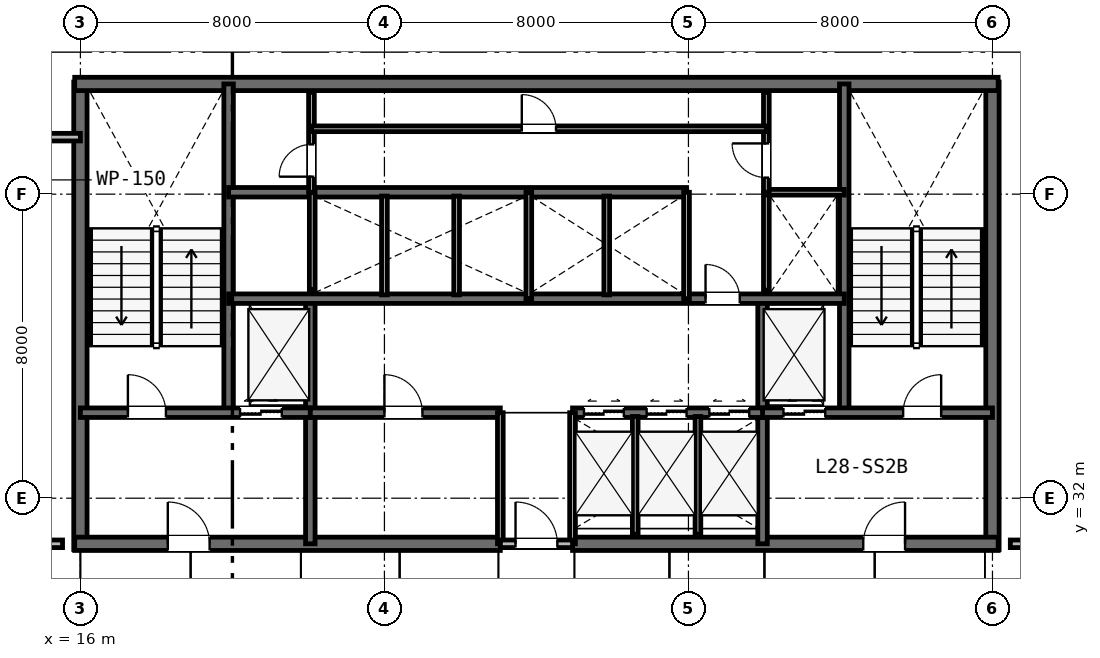
"""IFC4 building model, lengths in metres.
Left out: names, types, materials, properties, quantities, classifications, styles, units other than length and angle.
Written with IfcOpenShell. Run it as: python <this file> out.ifc"""

import sys

from ifc_helpers import new_model, si_unit, direction, frame, frame_2d, origin, place, context, subcontext, project, spatial, rectangle, extrude, element, fill, save


model = new_model("IFC4")
c1 = context("Model", 3, precision=1e-05, world=origin(), true_north=direction((0.0, 1.0)))
c2 = subcontext(c1, "Body", "Model", "MODEL_VIEW")
j1 = project(units=[si_unit("LENGTHUNIT", "METRE"), si_unit("PLANEANGLEUNIT", "RADIAN")], contexts=[c1])
p1 = place(None, origin())
s1 = spatial("IfcSite", under=j1, at=p1, CompositionType="ELEMENT")
p2 = place(p1, origin())
s2 = spatial("IfcBuilding", under=s1, at=p2, CompositionType="ELEMENT")
p3 = place(p2, frame((0.0, 0.0, 111.6)))
s3 = spatial("IfcBuildingStorey", under=s2, at=p3, CompositionType="ELEMENT", Elevation=111.6)
for number, where, z_axis, x_axis in (
    (1, (16.0, 30.65, 0.0), (0.0, 0.0, 1.0), (0.0, 1.0, 0.0)),
    (2, (40.0, 30.65, 0.0), (0.0, 0.0, 1.0), (0.0, 1.0, 0.0)),
):
    element("IfcWall", number, at=place(p3, frame(where, z_axis=z_axis, x_axis=x_axis)), inside=s3, PredefinedType="SHEAR", context=c2, shape_type="SweptSolid", body=[
        extrude(rectangle(XDim=12.3, YDim=0.35, at=frame_2d((6.15, 0.0))), origin(), (0.0, 0.0, 1.0), 3.6),
    ])
p4 = place(p3, frame((15.85, 42.9, 0.0), z_axis=(0.0, 0.0, 1.0), x_axis=(1.0, 0.0, 0.0)))
e3 = element("IfcWall", 3, at=p4, inside=s3, PredefinedType="SHEAR", context=c2, shape_type="SweptSolid", body=[
    extrude(rectangle(XDim=24.3, YDim=0.35, at=frame_2d((12.15, 0.0))), origin(), (0.0, 0.0, 1.0), 3.6),
])
p5 = place(p3, frame((15.85, 30.8, 0.0), z_axis=(0.0, 0.0, 1.0), x_axis=(1.0, 0.0, 0.0)))
e4 = element("IfcWall", 4, at=p5, inside=s3, PredefinedType="SHEAR", context=c2, shape_type="SweptSolid", body=[
    extrude(rectangle(XDim=11.2, YDim=0.35, at=frame_2d((5.6, 0.0))), origin(), (0.0, 0.0, 1.0), 3.6),
])
p6 = place(p5, frame((2.45, 0.0, 0.0)))
e5 = element("IfcOpeningElement", 5, at=p6, cuts=e4, PredefinedType="OPENING", context=c2, shape_type="SweptSolid", body=[
    extrude(rectangle(XDim=1.1, YDim=2.15, at=frame_2d((0.55, 1.075))), frame((0.0, 0.185, 0.0), z_axis=(0.0, -1.0, 0.0), x_axis=(1.0, 0.0, 0.0)), (0.0, 0.0, 1.0), 0.37),
])
p7 = place(p3, frame((28.95, 30.8, 0.0), z_axis=(0.0, 0.0, 1.0), x_axis=(1.0, 0.0, 0.0)))
e6 = element("IfcWall", 6, at=p7, inside=s3, PredefinedType="SHEAR", context=c2, shape_type="SweptSolid", body=[
    extrude(rectangle(XDim=11.2, YDim=0.35, at=frame_2d((5.6, 0.0))), origin(), (0.0, 0.0, 1.0), 3.6),
])
p8 = place(p7, frame((7.65, 0.0, 0.0)))
e7 = element("IfcOpeningElement", 7, at=p8, cuts=e6, PredefinedType="OPENING", context=c2, shape_type="SweptSolid", body=[
    extrude(rectangle(XDim=1.1, YDim=2.15, at=frame_2d((0.55, 1.075))), frame((0.0, 0.185, 0.0), z_axis=(0.0, -1.0, 0.0), x_axis=(1.0, 0.0, 0.0)), (0.0, 0.0, 1.0), 0.37),
])
for number, where, z_axis, x_axis in (
    (8, (19.9, 34.25, 0.0), (0.0, 0.0, 1.0), (0.0, 1.0, 0.0)),
    (9, (36.1, 34.25, 0.0), (0.0, 0.0, 1.0), (0.0, 1.0, 0.0)),
):
    element("IfcWall", number, at=place(p3, frame(where, z_axis=z_axis, x_axis=x_axis)), inside=s3, PredefinedType="SHEAR", context=c2, shape_type="SweptSolid", body=[
        extrude(rectangle(XDim=8.65, YDim=0.25, at=frame_2d((4.325, 0.0))), origin(), (0.0, 0.0, 1.0), 3.6),
    ])
for number, where, z_axis, x_axis in (
    (10, (22.05, 30.8, 0.0), (0.0, 0.0, 1.0), (0.0, 1.0, 0.0)),
    (11, (33.95, 30.8, 0.0), (0.0, 0.0, 1.0), (0.0, 1.0, 0.0)),
):
    element("IfcWall", number, at=place(p3, frame(where, z_axis=z_axis, x_axis=x_axis)), inside=s3, PredefinedType="SHEAR", context=c2, shape_type="SweptSolid", body=[
        extrude(rectangle(XDim=6.45, YDim=0.25, at=frame_2d((3.225, 0.0))), origin(), (0.0, 0.0, 1.0), 3.6),
    ])
p9 = place(p3, frame((16.0, 34.25, 0.0), z_axis=(0.0, 0.0, 1.0), x_axis=(1.0, 0.0, 0.0)))
e12 = element("IfcWall", 12, at=p9, inside=s3, PredefinedType="SHEAR", context=c2, shape_type="SweptSolid", body=[
    extrude(rectangle(XDim=6.05, YDim=0.25, at=frame_2d((3.025, 0.0))), origin(), (0.0, 0.0, 1.0), 3.6),
])
p10 = place(p9, frame((1.25, 0.0, 0.0)))
e13 = element("IfcOpeningElement", 13, at=p10, cuts=e12, PredefinedType="OPENING", context=c2, shape_type="SweptSolid", body=[
    extrude(rectangle(XDim=1.0, YDim=2.15, at=frame_2d((0.5, 1.075))), frame((0.0, 0.135, 0.0), z_axis=(0.0, -1.0, 0.0), x_axis=(1.0, 0.0, 0.0)), (0.0, 0.0, 1.0), 0.27),
])
p11 = place(p9, frame((4.2, 0.0, 0.0)))
e14 = element("IfcOpeningElement", 14, at=p11, cuts=e12, PredefinedType="OPENING", context=c2, shape_type="SweptSolid", body=[
    extrude(rectangle(XDim=1.1, YDim=2.15, at=frame_2d((0.55, 1.075))), frame((0.0, 0.135, 0.0), z_axis=(0.0, -1.0, 0.0), x_axis=(1.0, 0.0, 0.0)), (0.0, 0.0, 1.0), 0.27),
])
p12 = place(p3, frame((33.95, 34.25, 0.0), z_axis=(0.0, 0.0, 1.0), x_axis=(1.0, 0.0, 0.0)))
e15 = element("IfcWall", 15, at=p12, inside=s3, PredefinedType="SHEAR", context=c2, shape_type="SweptSolid", body=[
    extrude(rectangle(XDim=6.05, YDim=0.25, at=frame_2d((3.025, 0.0))), origin(), (0.0, 0.0, 1.0), 3.6),
])
p13 = place(p12, frame((3.7, 0.0, 0.0)))
e16 = element("IfcOpeningElement", 16, at=p13, cuts=e15, PredefinedType="OPENING", context=c2, shape_type="SweptSolid", body=[
    extrude(rectangle(XDim=1.0, YDim=2.15, at=frame_2d((0.5, 1.075))), frame((0.0, 0.135, 0.0), z_axis=(0.0, -1.0, 0.0), x_axis=(1.0, 0.0, 0.0)), (0.0, 0.0, 1.0), 0.27),
])
p14 = place(p12, frame((0.55, 0.0, 0.0)))
e17 = element("IfcOpeningElement", 17, at=p14, cuts=e15, PredefinedType="OPENING", context=c2, shape_type="SweptSolid", body=[
    extrude(rectangle(XDim=1.1, YDim=2.15, at=frame_2d((0.55, 1.075))), frame((0.0, 0.135, 0.0), z_axis=(0.0, -1.0, 0.0), x_axis=(1.0, 0.0, 0.0)), (0.0, 0.0, 1.0), 0.27),
])
p15 = place(p3, frame((22.05, 34.25, 0.0), z_axis=(0.0, 0.0, 1.0), x_axis=(1.0, 0.0, 0.0)))
e18 = element("IfcWall", 18, at=p15, inside=s3, PredefinedType="SHEAR", context=c2, shape_type="SweptSolid", body=[
    extrude(rectangle(XDim=5.0, YDim=0.25, at=frame_2d((2.5, 0.0))), origin(), (0.0, 0.0, 1.0), 3.6),
])
p16 = place(p15, frame((1.95, 0.0, 0.0)))
e19 = element("IfcOpeningElement", 19, at=p16, cuts=e18, PredefinedType="OPENING", context=c2, shape_type="SweptSolid", body=[
    extrude(rectangle(XDim=1.0, YDim=2.15, at=frame_2d((0.5, 1.075))), frame((0.0, 0.135, 0.0), z_axis=(0.0, -1.0, 0.0), x_axis=(1.0, 0.0, 0.0)), (0.0, 0.0, 1.0), 0.27),
])
p17 = place(p3, frame((28.95, 34.25, 0.0), z_axis=(0.0, 0.0, 1.0), x_axis=(1.0, 0.0, 0.0)))
e20 = element("IfcWall", 20, at=p17, inside=s3, PredefinedType="SHEAR", context=c2, shape_type="SweptSolid", body=[
    extrude(rectangle(XDim=5.0, YDim=0.25, at=frame_2d((2.5, 0.0))), origin(), (0.0, 0.0, 1.0), 3.6),
])
p18 = place(p17, frame((0.3, 0.0, 0.0)))
e21 = element("IfcOpeningElement", 21, at=p18, cuts=e20, PredefinedType="OPENING", context=c2, shape_type="SweptSolid", body=[
    extrude(rectangle(XDim=1.05, YDim=2.15, at=frame_2d((0.525, 1.075))), frame((0.0, 0.135, 0.0), z_axis=(0.0, -1.0, 0.0), x_axis=(1.0, 0.0, 0.0)), (0.0, 0.0, 1.0), 0.27),
])
p19 = place(p17, frame((1.95, 0.0, 0.0)))
e22 = element("IfcOpeningElement", 22, at=p19, cuts=e20, PredefinedType="OPENING", context=c2, shape_type="SweptSolid", body=[
    extrude(rectangle(XDim=1.05, YDim=2.15, at=frame_2d((0.525, 1.075))), frame((0.0, 0.135, 0.0), z_axis=(0.0, -1.0, 0.0), x_axis=(1.0, 0.0, 0.0)), (0.0, 0.0, 1.0), 0.27),
])
p20 = place(p17, frame((3.6, 0.0, 0.0)))
e23 = element("IfcOpeningElement", 23, at=p20, cuts=e20, PredefinedType="OPENING", context=c2, shape_type="SweptSolid", body=[
    extrude(rectangle(XDim=1.05, YDim=2.15, at=frame_2d((0.525, 1.075))), frame((0.0, 0.135, 0.0), z_axis=(0.0, -1.0, 0.0), x_axis=(1.0, 0.0, 0.0)), (0.0, 0.0, 1.0), 0.27),
])
p21 = place(p3, frame((19.9, 37.25, 0.0), z_axis=(0.0, 0.0, 1.0), x_axis=(1.0, 0.0, 0.0)))
e24 = element("IfcWall", 24, at=p21, inside=s3, PredefinedType="SHEAR", context=c2, shape_type="SweptSolid", body=[
    extrude(rectangle(XDim=16.2, YDim=0.25, at=frame_2d((8.1, 0.0))), origin(), (0.0, 0.0, 1.0), 3.6),
])
p22 = place(p21, frame((12.55, 0.0, 0.0)))
e25 = element("IfcOpeningElement", 25, at=p22, cuts=e24, PredefinedType="OPENING", context=c2, shape_type="SweptSolid", body=[
    extrude(rectangle(XDim=0.9, YDim=2.15, at=frame_2d((0.45, 1.075))), frame((0.0, 0.135, 0.0), z_axis=(0.0, -1.0, 0.0), x_axis=(1.0, 0.0, 0.0)), (0.0, 0.0, 1.0), 0.27),
])
p23 = place(p3, frame((19.9, 40.05, 0.0), z_axis=(0.0, 0.0, 1.0), x_axis=(1.0, 0.0, 0.0)))
e26 = element("IfcWall", 26, at=p23, inside=s3, PredefinedType="SHEAR", context=c2, shape_type="SweptSolid", body=[
    extrude(rectangle(XDim=12.05, YDim=0.25, at=frame_2d((6.025, 0.0))), origin(), (0.0, 0.0, 1.0), 3.6),
])
p24 = place(p3, frame((27.05, 30.8, 0.0), z_axis=(0.0, 0.0, 1.0), x_axis=(0.0, 1.0, 0.0)))
e27 = element("IfcWall", 27, at=p24, inside=s3, PredefinedType="PLUMBINGWALL", context=c2, shape_type="SweptSolid", body=[
    extrude(rectangle(XDim=3.45, YDim=0.15, at=frame_2d((1.725, 0.0))), origin(), (0.0, 0.0, 1.0), 3.01),
])
p25 = place(p3, frame((28.95, 30.8, 0.0), z_axis=(0.0, 0.0, 1.0), x_axis=(0.0, 1.0, 0.0)))
e28 = element("IfcWall", 28, at=p25, inside=s3, PredefinedType="PLUMBINGWALL", context=c2, shape_type="SweptSolid", body=[
    extrude(rectangle(XDim=3.45, YDim=0.15, at=frame_2d((1.725, 0.0))), origin(), (0.0, 0.0, 1.0), 3.33),
])
p26 = place(p3, frame((27.05, 30.8, 0.0), z_axis=(0.0, 0.0, 1.0), x_axis=(1.0, 0.0, 0.0)))
e29 = element("IfcWall", 29, at=p26, inside=s3, PredefinedType="PARTITIONING", context=c2, shape_type="SweptSolid", body=[
    extrude(rectangle(XDim=1.9, YDim=0.2, at=frame_2d((0.95, 0.0))), origin(), (0.0, 0.0, 1.0), 3.01),
])
p27 = place(p26, frame((0.4, 0.0, 0.0)))
e30 = element("IfcOpeningElement", 30, at=p27, cuts=e29, PredefinedType="OPENING", context=c2, shape_type="SweptSolid", body=[
    extrude(rectangle(XDim=1.1, YDim=2.15, at=frame_2d((0.55, 1.075))), frame((0.0, 0.11, 0.0), z_axis=(0.0, -1.0, 0.0), x_axis=(1.0, 0.0, 0.0)), (0.0, 0.0, 1.0), 0.22),
])
for number, where, z_axis, x_axis in (
    (31, (30.6, 31.05, 0.0), (0.0, 0.0, 1.0), (0.0, 1.0, 0.0)),
    (32, (32.25, 31.05, 0.0), (0.0, 0.0, 1.0), (0.0, 1.0, 0.0)),
):
    element("IfcWall", number, at=place(p3, frame(where, z_axis=z_axis, x_axis=x_axis)), inside=s3, PredefinedType="PLUMBINGWALL", context=c2, shape_type="SweptSolid", body=[
        extrude(rectangle(XDim=3.1, YDim=0.15, at=frame_2d((1.55, 0.0))), origin(), (0.0, 0.0, 1.0), 3.33),
    ])
p28 = place(p3, frame((22.1, 37.49, 0.0), z_axis=(0.0, 0.0, 1.0), x_axis=(0.0, 1.0, 0.0)))
e33 = element("IfcWall", 33, at=p28, inside=s3, PredefinedType="PLUMBINGWALL", context=c2, shape_type="SweptSolid", body=[
    extrude(rectangle(XDim=2.56, YDim=0.15, at=frame_2d((1.28, 0.0))), origin(), (0.0, 0.0, 1.0), 3.33),
])
p29 = place(p3, frame((27.8, 37.25, 0.0), z_axis=(0.0, 0.0, 1.0), x_axis=(0.0, 1.0, 0.0)))
e34 = element("IfcWall", 34, at=p29, inside=s3, PredefinedType="PLUMBINGWALL", context=c2, shape_type="SweptSolid", body=[
    extrude(rectangle(XDim=2.8, YDim=0.15, at=frame_2d((1.4, 0.0))), origin(), (0.0, 0.0, 1.0), 3.33),
])
for number, where, z_axis, x_axis in (
    (35, (24.0, 37.35, 0.0), (0.0, 0.0, 1.0), (0.0, 1.0, 0.0)),
    (36, (25.9, 37.35, 0.0), (0.0, 0.0, 1.0), (0.0, 1.0, 0.0)),
):
    element("IfcWall", number, at=place(p3, frame(where, z_axis=z_axis, x_axis=x_axis)), inside=s3, PredefinedType="PLUMBINGWALL", context=c2, shape_type="SweptSolid", body=[
        extrude(rectangle(XDim=2.6, YDim=0.15, at=frame_2d((1.3, 0.0))), origin(), (0.0, 0.0, 1.0), 3.33),
    ])
p30 = place(p3, frame((31.95, 37.25, 0.0), z_axis=(0.0, 0.0, 1.0), x_axis=(0.0, 1.0, 0.0)))
e37 = element("IfcWall", 37, at=p30, inside=s3, PredefinedType="PLUMBINGWALL", context=c2, shape_type="SweptSolid", body=[
    extrude(rectangle(XDim=2.8, YDim=0.15, at=frame_2d((1.4, 0.0))), origin(), (0.0, 0.0, 1.0), 3.33),
])
p31 = place(p3, frame((29.85, 37.35, 0.0), z_axis=(0.0, 0.0, 1.0), x_axis=(0.0, 1.0, 0.0)))
e38 = element("IfcWall", 38, at=p31, inside=s3, PredefinedType="PLUMBINGWALL", context=c2, shape_type="SweptSolid", body=[
    extrude(rectangle(XDim=2.6, YDim=0.15, at=frame_2d((1.3, 0.0))), origin(), (0.0, 0.0, 1.0), 3.33),
])
p32 = place(p3, frame((34.05, 37.473, 0.0), z_axis=(0.0, 0.0, 1.0), x_axis=(0.0, 1.0, 0.0)))
e39 = element("IfcWall", 39, at=p32, inside=s3, PredefinedType="PLUMBINGWALL", context=c2, shape_type="SweptSolid", body=[
    extrude(rectangle(XDim=2.577, YDim=0.15, at=frame_2d((1.288, 0.0))), origin(), (0.0, 0.0, 1.0), 3.33),
])
p33 = place(p3, frame((34.05, 40.05, 0.0), z_axis=(0.0, 0.0, 1.0), x_axis=(1.0, 0.0, 0.0)))
e40 = element("IfcWall", 40, at=p33, inside=s3, PredefinedType="PARTITIONING", context=c2, shape_type="SweptSolid", body=[
    extrude(rectangle(XDim=2.05, YDim=0.15, at=frame_2d((1.025, 0.0))), origin(), (0.0, 0.0, 1.0), 3.33),
])
p34 = place(p3, frame((34.05, 40.05, 0.0), z_axis=(0.0, 0.0, 1.0), x_axis=(0.0, 1.0, 0.0)))
e41 = element("IfcWall", 41, at=p34, inside=s3, PredefinedType="PARTITIONING", context=c2, shape_type="SweptSolid", body=[
    extrude(rectangle(XDim=2.63, YDim=0.15, at=frame_2d((1.315, 0.0))), origin(), (0.0, 0.0, 1.0), 3.33),
])
p35 = place(p34, frame((0.385, 0.0, 0.0)))
e42 = element("IfcOpeningElement", 42, at=p35, cuts=e41, PredefinedType="OPENING", context=c2, shape_type="SweptSolid", body=[
    extrude(rectangle(XDim=0.9, YDim=2.15, at=frame_2d((0.45, 1.075))), frame((0.0, 0.085, 0.0), z_axis=(0.0, -1.0, 0.0), x_axis=(1.0, 0.0, 0.0)), (0.0, 0.0, 1.0), 0.17),
])
p36 = place(p3, frame((22.08, 40.05, 0.0), z_axis=(0.0, 0.0, 1.0), x_axis=(0.0, 1.0, 0.0)))
e43 = element("IfcWall", 43, at=p36, inside=s3, PredefinedType="PARTITIONING", context=c2, shape_type="SweptSolid", body=[
    extrude(rectangle(XDim=2.63, YDim=0.15, at=frame_2d((1.315, 0.0))), origin(), (0.0, 0.0, 1.0), 3.33),
])
p37 = place(p36, frame((0.41, 0.0, 0.0)))
e44 = element("IfcOpeningElement", 44, at=p37, cuts=e43, PredefinedType="OPENING", context=c2, shape_type="SweptSolid", body=[
    extrude(rectangle(XDim=0.85, YDim=2.15, at=frame_2d((0.425, 1.075))), frame((0.0, 0.085, 0.0), z_axis=(0.0, -1.0, 0.0), x_axis=(1.0, 0.0, 0.0)), (0.0, 0.0, 1.0), 0.17),
])
p38 = place(p3, frame((22.08, 41.72, 0.0), z_axis=(0.0, 0.0, 1.0), x_axis=(1.0, 0.0, 0.0)))
e45 = element("IfcWall", 45, at=p38, inside=s3, PredefinedType="PARTITIONING", context=c2, shape_type="SweptSolid", body=[
    extrude(rectangle(XDim=11.97, YDim=0.15, at=frame_2d((5.985, 0.0))), origin(), (0.0, 0.0, 1.0), 3.33),
])
p39 = place(p38, frame((5.535, 0.0, 0.0)))
e46 = element("IfcOpeningElement", 46, at=p39, cuts=e45, PredefinedType="OPENING", context=c2, shape_type="SweptSolid", body=[
    extrude(rectangle(XDim=0.9, YDim=2.15, at=frame_2d((0.45, 1.075))), frame((0.0, 0.085, 0.0), z_axis=(0.0, -1.0, 0.0), x_axis=(1.0, 0.0, 0.0)), (0.0, 0.0, 1.0), 0.17),
])
p40 = place(p3, frame((11.4, 30.8, 0.0), z_axis=(0.0, 0.0, 1.0), x_axis=(1.0, 0.0, 0.0)))
e47 = element("IfcWall", 47, at=p40, inside=s3, PredefinedType="PARTITIONING", context=c2, shape_type="SweptSolid", body=[
    extrude(rectangle(XDim=4.13, YDim=0.2, at=frame_2d((2.065, 0.0))), origin(), (0.0, 0.0, 1.0), 2.87),
])
p41 = place(p3, frame((40.47, 30.8, 0.0), z_axis=(0.0, 0.0, 1.0), x_axis=(1.0, 0.0, 0.0)))
e48 = element("IfcWall", 48, at=p41, inside=s3, PredefinedType="PARTITIONING", context=c2, shape_type="SweptSolid", body=[
    extrude(rectangle(XDim=1.73, YDim=0.2, at=frame_2d((0.865, 0.0))), origin(), (0.0, 0.0, 1.0), 2.87),
])
p42 = place(p3, frame((0.1, 41.5, 0.0), z_axis=(0.0, 0.0, 1.0), x_axis=(1.0, 0.0, 0.0)))
e49 = element("IfcWall", 49, at=p42, inside=s3, PredefinedType="PARTITIONING", context=c2, shape_type="SweptSolid", body=[
    extrude(rectangle(XDim=15.9, YDim=0.2, at=frame_2d((7.95, 0.0))), origin(), (0.0, 0.0, 1.0), 2.87),
])
p43 = place(p42, frame((9.877, 0.0, 0.0)))
e50 = element("IfcOpeningElement", 50, at=p43, cuts=e49, PredefinedType="OPENING", context=c2, shape_type="SweptSolid", body=[
    extrude(rectangle(XDim=0.95, YDim=2.15, at=frame_2d((0.475, 1.075))), frame((0.0, 0.11, 0.0), z_axis=(0.0, -1.0, 0.0), x_axis=(1.0, 0.0, 0.0)), (0.0, 0.0, 1.0), 0.22),
])
p44 = place(p27, origin())
e51 = element("IfcDoor", 51, at=p44, inside=s3, OperationType="SINGLE_SWING_LEFT", PredefinedType="DOOR", context=c2, shape_type="SweptSolid", body=[
    extrude(rectangle(XDim=1.1, YDim=2.15, at=frame_2d((0.55, 1.075))), frame((0.0, 0.025, 0.0), z_axis=(0.0, -1.0, 0.0), x_axis=(1.0, 0.0, 0.0)), (0.0, 0.0, 1.0), 0.05),
])
fill(e30, e51)
p45 = place(p10, origin())
e52 = element("IfcDoor", 52, at=p45, inside=s3, OperationType="SINGLE_SWING_LEFT", PredefinedType="DOOR", context=c2, shape_type="SweptSolid", body=[
    extrude(rectangle(XDim=1.0, YDim=2.15, at=frame_2d((0.5, 1.075))), frame((0.0, 0.025, 0.0), z_axis=(0.0, -1.0, 0.0), x_axis=(1.0, 0.0, 0.0)), (0.0, 0.0, 1.0), 0.05),
])
fill(e13, e52)
p46 = place(p13, origin())
e53 = element("IfcDoor", 53, at=p46, inside=s3, OperationType="SINGLE_SWING_RIGHT", PredefinedType="DOOR", context=c2, shape_type="SweptSolid", body=[
    extrude(rectangle(XDim=1.0, YDim=2.15, at=frame_2d((0.5, 1.075))), frame((0.0, 0.025, 0.0), z_axis=(0.0, -1.0, 0.0), x_axis=(1.0, 0.0, 0.0)), (0.0, 0.0, 1.0), 0.05),
])
fill(e16, e53)
p47 = place(p6, origin())
e54 = element("IfcDoor", 54, at=p47, inside=s3, OperationType="SINGLE_SWING_LEFT", PredefinedType="DOOR", context=c2, shape_type="SweptSolid", body=[
    extrude(rectangle(XDim=1.1, YDim=2.15, at=frame_2d((0.55, 1.075))), frame((0.0, 0.025, 0.0), z_axis=(0.0, -1.0, 0.0), x_axis=(1.0, 0.0, 0.0)), (0.0, 0.0, 1.0), 0.05),
])
fill(e5, e54)
p48 = place(p8, origin())
e55 = element("IfcDoor", 55, at=p48, inside=s3, OperationType="SINGLE_SWING_RIGHT", PredefinedType="DOOR", context=c2, shape_type="SweptSolid", body=[
    extrude(rectangle(XDim=1.1, YDim=2.15, at=frame_2d((0.55, 1.075))), frame((0.0, 0.025, 0.0), z_axis=(0.0, -1.0, 0.0), x_axis=(1.0, 0.0, 0.0)), (0.0, 0.0, 1.0), 0.05),
])
fill(e7, e55)
p49 = place(p16, origin())
e56 = element("IfcDoor", 56, at=p49, inside=s3, OperationType="SINGLE_SWING_LEFT", PredefinedType="DOOR", context=c2, shape_type="SweptSolid", body=[
    extrude(rectangle(XDim=1.0, YDim=2.15, at=frame_2d((0.5, 1.075))), frame((0.0, 0.025, 0.0), z_axis=(0.0, -1.0, 0.0), x_axis=(1.0, 0.0, 0.0)), (0.0, 0.0, 1.0), 0.05),
])
fill(e19, e56)
p50 = place(p22, origin())
e57 = element("IfcDoor", 57, at=p50, inside=s3, OperationType="SINGLE_SWING_LEFT", PredefinedType="DOOR", context=c2, shape_type="SweptSolid", body=[
    extrude(rectangle(XDim=0.9, YDim=2.15, at=frame_2d((0.45, 1.075))), frame((0.0, 0.025, 0.0), z_axis=(0.0, -1.0, 0.0), x_axis=(1.0, 0.0, 0.0)), (0.0, 0.0, 1.0), 0.05),
])
fill(e25, e57)
p51 = place(p35, origin())
e58 = element("IfcDoor", 58, at=p51, inside=s3, OperationType="SINGLE_SWING_RIGHT", PredefinedType="DOOR", context=c2, shape_type="SweptSolid", body=[
    extrude(rectangle(XDim=0.9, YDim=2.15, at=frame_2d((0.45, 1.075))), frame((0.0, 0.025, 0.0), z_axis=(0.0, -1.0, 0.0), x_axis=(1.0, 0.0, 0.0)), (0.0, 0.0, 1.0), 0.05),
])
fill(e42, e58)
p52 = place(p37, origin())
e59 = element("IfcDoor", 59, at=p52, inside=s3, OperationType="SINGLE_SWING_LEFT", PredefinedType="DOOR", context=c2, shape_type="SweptSolid", body=[
    extrude(rectangle(XDim=0.85, YDim=2.15, at=frame_2d((0.425, 1.075))), frame((0.0, 0.025, 0.0), z_axis=(0.0, -1.0, 0.0), x_axis=(1.0, 0.0, 0.0)), (0.0, 0.0, 1.0), 0.05),
])
fill(e44, e59)
p53 = place(p39, origin())
e60 = element("IfcDoor", 60, at=p53, inside=s3, OperationType="SINGLE_SWING_LEFT", PredefinedType="DOOR", context=c2, shape_type="SweptSolid", body=[
    extrude(rectangle(XDim=0.9, YDim=2.15, at=frame_2d((0.45, 1.075))), frame((0.0, 0.025, 0.0), z_axis=(0.0, -1.0, 0.0), x_axis=(1.0, 0.0, 0.0)), (0.0, 0.0, 1.0), 0.05),
])
fill(e46, e60)
p54 = place(p11, origin())
e61 = element("IfcDoor", 61, at=p54, inside=s3, OperationType="DOUBLE_DOOR_SLIDING", PredefinedType="DOOR", context=c2, shape_type="SweptSolid", body=[
    extrude(rectangle(XDim=1.1, YDim=2.15, at=frame_2d((0.55, 1.075))), frame((0.0, 0.025, 0.0), z_axis=(0.0, -1.0, 0.0), x_axis=(1.0, 0.0, 0.0)), (0.0, 0.0, 1.0), 0.05),
])
fill(e14, e61)
p55 = place(p14, origin())
e62 = element("IfcDoor", 62, at=p55, inside=s3, OperationType="DOUBLE_DOOR_SLIDING", PredefinedType="DOOR", context=c2, shape_type="SweptSolid", body=[
    extrude(rectangle(XDim=1.1, YDim=2.15, at=frame_2d((0.55, 1.075))), frame((0.0, 0.025, 0.0), z_axis=(0.0, -1.0, 0.0), x_axis=(1.0, 0.0, 0.0)), (0.0, 0.0, 1.0), 0.05),
])
fill(e17, e62)
p56 = place(p18, origin())
e63 = element("IfcDoor", 63, at=p56, inside=s3, OperationType="DOUBLE_DOOR_SLIDING", PredefinedType="DOOR", context=c2, shape_type="SweptSolid", body=[
    extrude(rectangle(XDim=1.05, YDim=2.15, at=frame_2d((0.525, 1.075))), frame((0.0, 0.025, 0.0), z_axis=(0.0, -1.0, 0.0), x_axis=(1.0, 0.0, 0.0)), (0.0, 0.0, 1.0), 0.05),
])
fill(e21, e63)
p57 = place(p19, origin())
e64 = element("IfcDoor", 64, at=p57, inside=s3, OperationType="DOUBLE_DOOR_SLIDING", PredefinedType="DOOR", context=c2, shape_type="SweptSolid", body=[
    extrude(rectangle(XDim=1.05, YDim=2.15, at=frame_2d((0.525, 1.075))), frame((0.0, 0.025, 0.0), z_axis=(0.0, -1.0, 0.0), x_axis=(1.0, 0.0, 0.0)), (0.0, 0.0, 1.0), 0.05),
])
fill(e22, e64)
p58 = place(p20, origin())
e65 = element("IfcDoor", 65, at=p58, inside=s3, OperationType="DOUBLE_DOOR_SLIDING", PredefinedType="DOOR", context=c2, shape_type="SweptSolid", body=[
    extrude(rectangle(XDim=1.05, YDim=2.15, at=frame_2d((0.525, 1.075))), frame((0.0, 0.025, 0.0), z_axis=(0.0, -1.0, 0.0), x_axis=(1.0, 0.0, 0.0)), (0.0, 0.0, 1.0), 0.05),
])
fill(e23, e65)
save(model, sys.argv[1])
